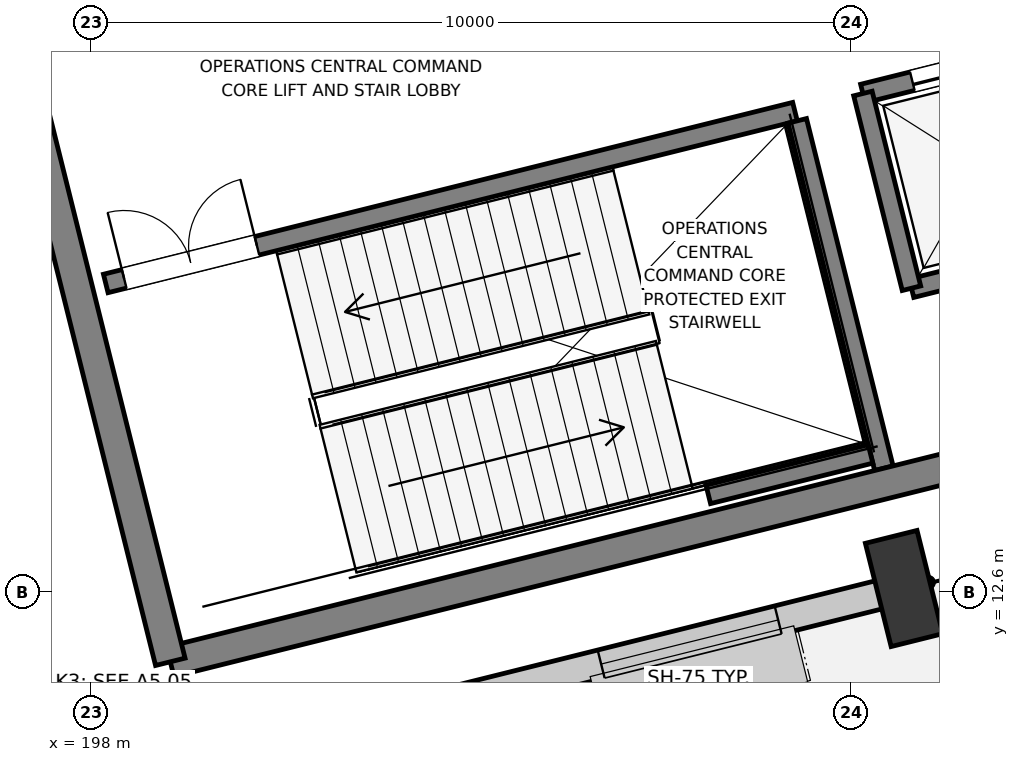
"""IFC4 building model, lengths in metres.
Left out: names, types, materials, properties, quantities, classifications, styles, units other than length and angle.
Written with IfcOpenShell. Run it as: python <this file> out.ifc"""

import sys

from ifc_helpers import new_model, si_unit, direction, frame, frame_2d, origin, origin_2d, place, context, subcontext, project, spatial, rectangle, extrude, element, fill, save


model = new_model("IFC4")
c1 = context("Model", 3, precision=1e-05, world=origin(), true_north=direction((0.0, 1.0)))
c2 = subcontext(c1, "Body", "Model", "MODEL_VIEW")
j1 = project(units=[si_unit("LENGTHUNIT", "METRE"), si_unit("PLANEANGLEUNIT", "RADIAN")], contexts=[c1])
p1 = place(None, origin())
s1 = spatial("IfcSite", under=j1, at=p1, CompositionType="ELEMENT")
p2 = place(p1, origin())
s2 = spatial("IfcBuilding", under=s1, at=p2, CompositionType="ELEMENT")
p3 = place(p2, origin())
s3 = spatial("IfcBuildingStorey", under=s2, at=p3, CompositionType="ELEMENT", Elevation=0.0)
p4 = place(p3, frame((208.693, 12.645, 0.0), z_axis=(0.0, 0.0, 1.0), x_axis=(0.970295726276, 0.2419218956, 0.0)))
e1 = element("IfcColumn", 1, at=p4, inside=s3, PredefinedType="COLUMN", context=c2, shape_type="SweptSolid", body=[
    extrude(rectangle(XDim=0.7, YDim=1.4, at=origin_2d()), origin(), (0.0, 0.0, 1.0), 6.0),
])
p5 = place(p3, frame((198.326, 10.06, 0.0), z_axis=(0.0, 0.0, 1.0), x_axis=(0.970293766674, 0.241929755, 0.0)))
e2 = element("IfcWall", 2, at=p5, inside=s3, PredefinedType="STANDARD", context=c2, shape_type="SweptSolid", body=[
    extrude(rectangle(XDim=10.37, YDim=0.38, at=frame_2d((5.185, 0.0))), origin(), (0.0, 0.0, 1.0), 4.365),
])
p6 = place(p5, frame((1.393, 0.0, 0.85)))
e3 = element("IfcOpeningElement", 3, at=p6, cuts=e2, PredefinedType="OPENING", context=c2, shape_type="SweptSolid", body=[
    extrude(rectangle(XDim=2.4, YDim=1.8, at=frame_2d((1.2, 0.9))), frame((0.0, 0.2, 0.0), z_axis=(0.0, -1.0, 0.0), x_axis=(1.0, 0.0, 0.0)), (0.0, 0.0, 1.0), 0.4),
])
p7 = place(p5, frame((6.577, 0.0, 0.85)))
e4 = element("IfcOpeningElement", 4, at=p7, cuts=e2, PredefinedType="OPENING", context=c2, shape_type="SweptSolid", body=[
    extrude(rectangle(XDim=2.4, YDim=1.8, at=frame_2d((1.2, 0.9))), frame((0.0, 0.2, 0.0), z_axis=(0.0, -1.0, 0.0), x_axis=(1.0, 0.0, 0.0)), (0.0, 0.0, 1.0), 0.4),
])
p8 = place(p3, frame((208.79, 16.595, 0.0), z_axis=(0.0, 0.0, 1.0), x_axis=(0.97029284861, 0.241933436994, 0.0)))
e5 = element("IfcWall", 5, at=p8, inside=s3, PredefinedType="SOLIDWALL", context=c2, shape_type="SweptSolid", body=[
    extrude(rectangle(XDim=2.54, YDim=0.25, at=frame_2d((1.27, 0.0))), origin(), (0.0, 0.0, 1.0), 5.64),
])
p9 = place(p3, frame((210.616, 19.771, 0.0), z_axis=(0.0, 0.0, 1.0), x_axis=(-0.97029284861, -0.241933436994, 0.0)))
e6 = element("IfcWall", 6, at=p9, inside=s3, PredefinedType="SOLIDWALL", context=c2, shape_type="SweptSolid", body=[
    extrude(rectangle(XDim=2.54, YDim=0.25, at=frame_2d((1.27, 0.0))), origin(), (0.0, 0.0, 1.0), 5.64),
])
p10 = place(p9, frame((0.67, 0.0, 0.0)))
e7 = element("IfcOpeningElement", 7, at=p10, cuts=e6, PredefinedType="OPENING", context=c2, shape_type="SweptSolid", body=[
    extrude(rectangle(XDim=1.2, YDim=2.2, at=frame_2d((0.6, 1.1))), frame((0.0, 0.135, 0.0), z_axis=(0.0, -1.0, 0.0), x_axis=(1.0, 0.0, 0.0)), (0.0, 0.0, 1.0), 0.27),
])
p11 = place(p3, frame((208.151, 19.157, 0.0), z_axis=(0.0, 0.0, 1.0), x_axis=(0.241938414856, -0.970291607413, 0.0)))
e8 = element("IfcWall", 8, at=p11, inside=s3, PredefinedType="SOLIDWALL", context=c2, shape_type="SweptSolid", body=[
    extrude(rectangle(XDim=2.64, YDim=0.25, at=frame_2d((1.32, 0.0))), origin(), (0.0, 0.0, 1.0), 5.64),
])
p12 = place(p3, frame((198.19, 16.658, 0.0), z_axis=(0.0, 0.0, 1.0), x_axis=(0.970297151331, 0.241916179943, 0.0)))
e9 = element("IfcWall", 9, at=p12, inside=s3, PredefinedType="SOLIDWALL", context=c2, shape_type="SweptSolid", body=[
    extrude(rectangle(XDim=9.345, YDim=0.25, at=frame_2d((4.673, 0.0))), origin(), (0.0, 0.0, 1.0), 5.62),
])
p13 = place(p12, frame((0.25, 0.0, 0.0)))
e10 = element("IfcOpeningElement", 10, at=p13, cuts=e9, PredefinedType="OPENING", context=c2, shape_type="SweptSolid", body=[
    extrude(rectangle(XDim=1.8, YDim=2.25, at=frame_2d((0.9, 1.125))), frame((0.0, 0.135, 0.0), z_axis=(0.0, -1.0, 0.0), x_axis=(1.0, 0.0, 0.0)), (0.0, 0.0, 1.0), 0.27),
])
p14 = place(p3, frame((208.427, 14.227, 0.0), z_axis=(0.0, 0.0, 1.0), x_axis=(-0.241911120435, 0.970298412763, 0.0)))
e11 = element("IfcWall", 11, at=p14, inside=s3, PredefinedType="SOLIDWALL", context=c2, shape_type="SweptSolid", body=[
    extrude(rectangle(XDim=4.71, YDim=0.25, at=frame_2d((2.355, 0.0))), origin(), (0.0, 0.0, 1.0), 5.62),
])
p15 = place(p3, frame((206.117, 13.883, 0.0), z_axis=(0.0, 0.0, 1.0), x_axis=(0.97029738597, 0.241915238833, 0.0)))
e12 = element("IfcWall", 12, at=p15, inside=s3, PredefinedType="SOLIDWALL", context=c2, shape_type="SweptSolid", body=[
    extrude(rectangle(XDim=2.2, YDim=0.25, at=frame_2d((1.1, 0.0))), origin(), (0.0, 0.0, 1.0), 5.62),
])
p16 = place(p3, frame((199.04, 11.681, 0.0), z_axis=(0.0, 0.0, 1.0), x_axis=(0.970295578967, 0.241922486422, 0.0)))
e13 = element("IfcWall", 13, at=p16, inside=s3, PredefinedType="SHEAR", context=c2, shape_type="SweptSolid", body=[
    extrude(rectangle(XDim=14.2, YDim=0.4, at=frame_2d((7.1, 0.0))), origin(), (0.0, 0.0, 1.0), 5.64),
])
p17 = place(p3, frame((196.862, 20.413, 0.0), z_axis=(0.0, 0.0, 1.0), x_axis=(0.241921199913, -0.97029589973, 0.0)))
e14 = element("IfcWall", 14, at=p17, inside=s3, PredefinedType="SHEAR", context=c2, shape_type="SweptSolid", body=[
    extrude(rectangle(XDim=9.0, YDim=0.4, at=frame_2d((4.5, 0.0))), origin(), (0.0, 0.0, 1.0), 5.64),
])
p18 = place(p7, origin())
e15 = element("IfcWindow", 15, at=p18, inside=s3, PartitioningType="SINGLE_PANEL", PredefinedType="WINDOW", context=c2, shape_type="SweptSolid", body=[
    extrude(rectangle(XDim=2.4, YDim=1.8, at=frame_2d((1.2, 0.9))), frame((0.0, 0.03, 0.0), z_axis=(0.0, -1.0, 0.0), x_axis=(1.0, 0.0, 0.0)), (0.0, 0.0, 1.0), 0.06),
])
fill(e4, e15)
p19 = place(p10, origin())
e16 = element("IfcDoor", 16, at=p19, inside=s3, OperationType="SLIDING_TO_LEFT", PredefinedType="DOOR", context=c2, shape_type="SweptSolid", body=[
    extrude(rectangle(XDim=1.2, YDim=2.2, at=frame_2d((0.6, 1.1))), frame((0.0, 0.025, 0.0), z_axis=(0.0, -1.0, 0.0), x_axis=(1.0, 0.0, 0.0)), (0.0, 0.0, 1.0), 0.05),
])
fill(e7, e16)
p20 = place(p13, origin())
e17 = element("IfcDoor", 17, at=p20, inside=s3, OperationType="DOUBLE_DOOR_SINGLE_SWING", PredefinedType="DOOR", context=c2, shape_type="SweptSolid", body=[
    extrude(rectangle(XDim=1.8, YDim=2.25, at=frame_2d((0.9, 1.125))), frame((0.0, 0.025, 0.0), z_axis=(0.0, -1.0, 0.0), x_axis=(1.0, 0.0, 0.0)), (0.0, 0.0, 1.0), 0.05),
])
fill(e10, e17)
save(model, sys.argv[1])
